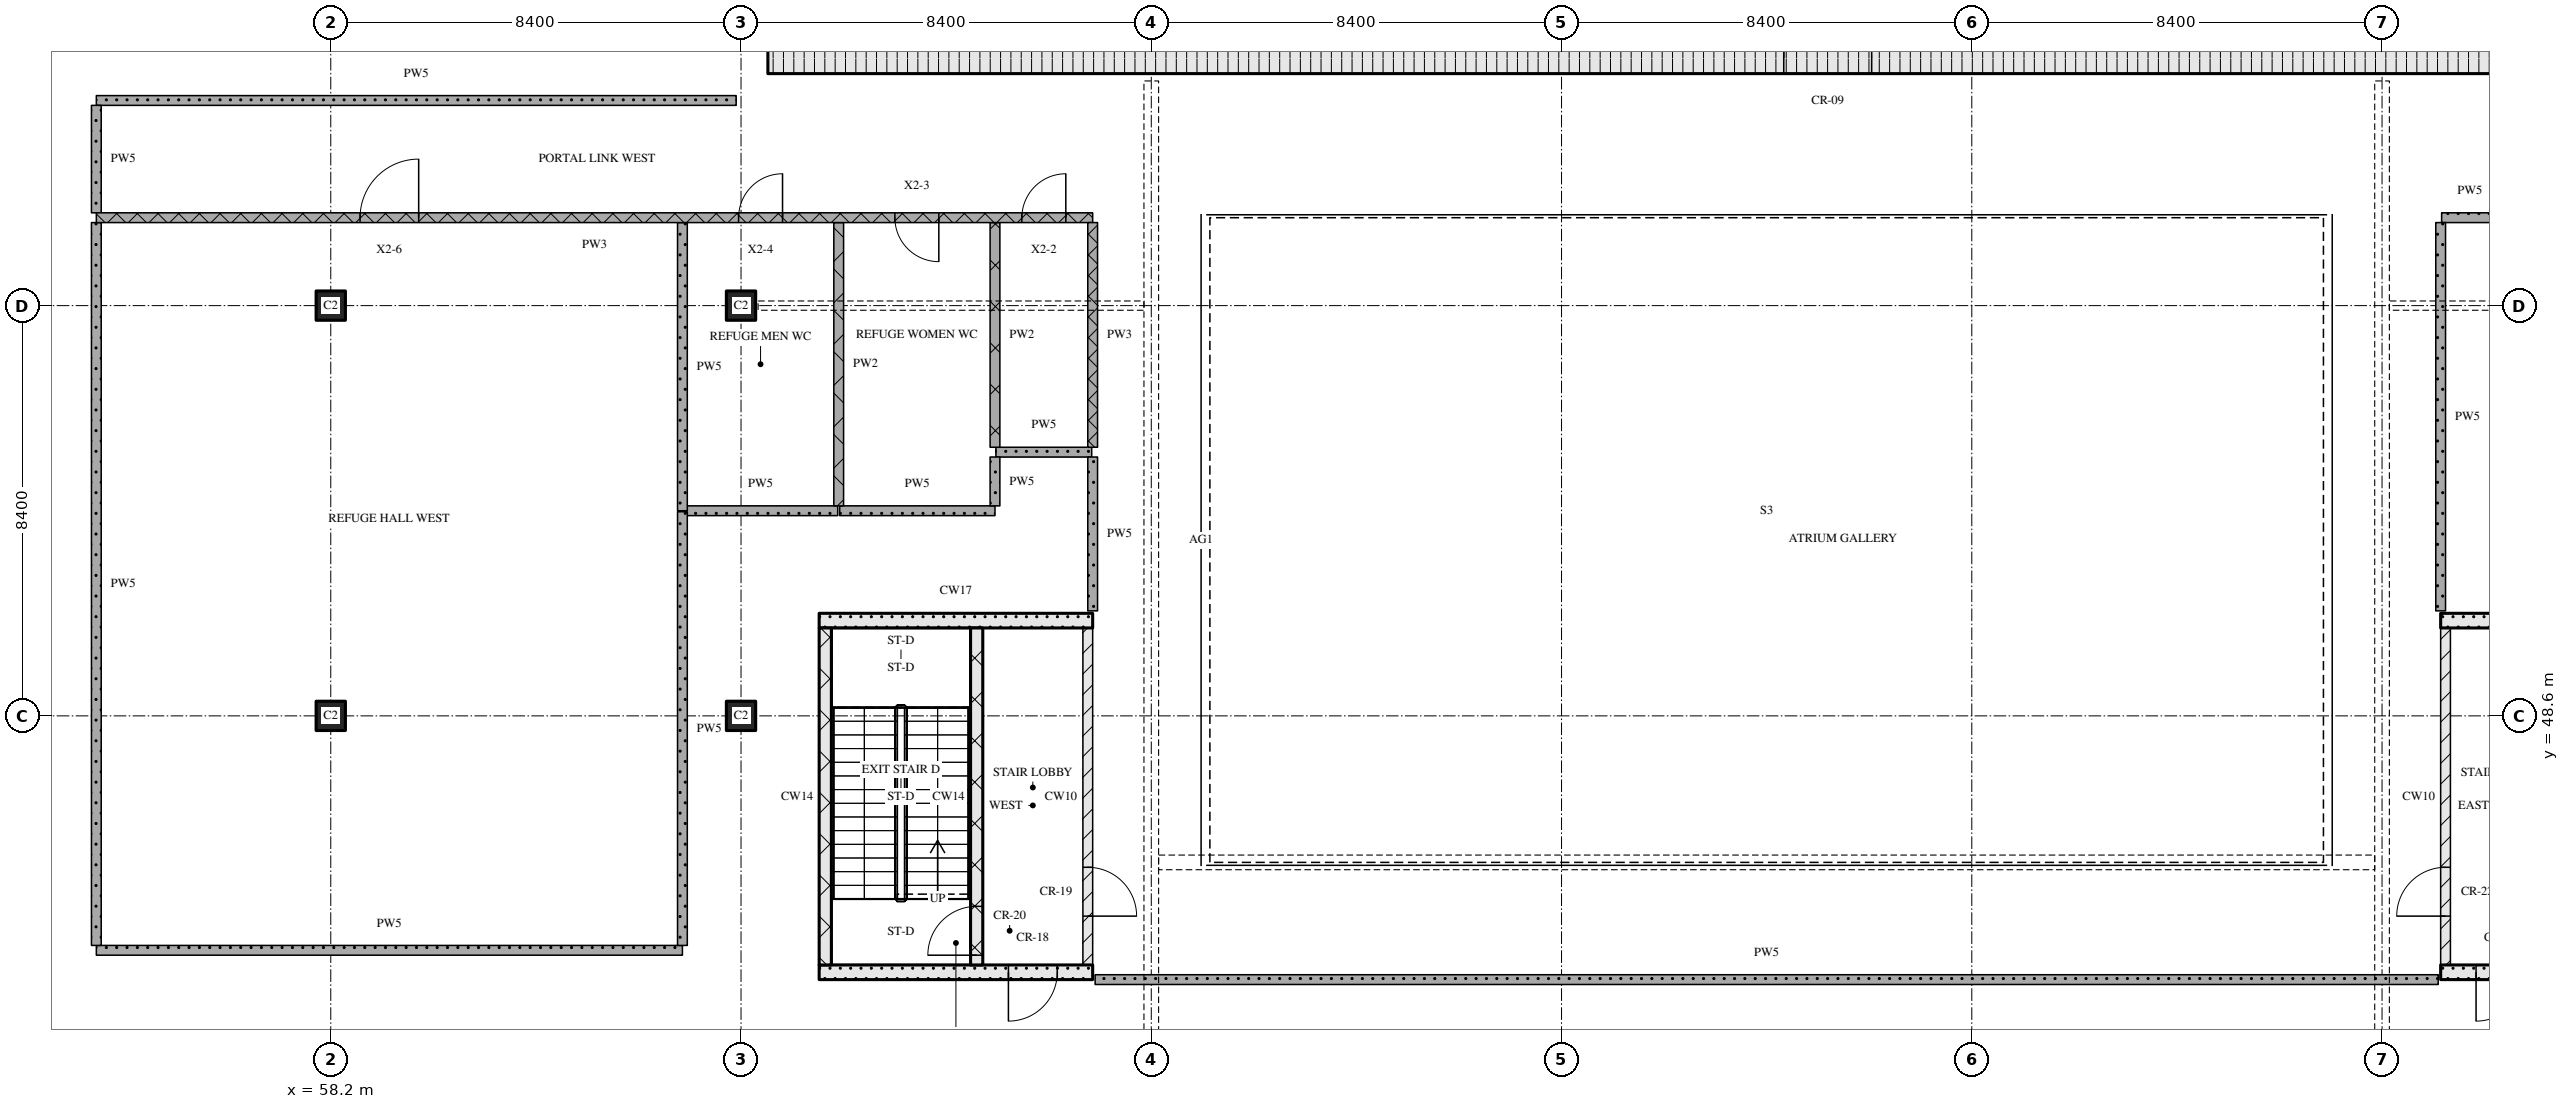
"""IFC4 building model, lengths in metres.
Left out: names, types, materials, properties, quantities, classifications, styles, units other than length and angle.
Written with IfcOpenShell. Run it as: python <this file> out.ifc"""

import sys

from ifc_helpers import new_model, si_unit, direction, frame, frame_2d, origin, origin_2d, place, context, subcontext, project, spatial, rectangle, extrude, element, fill, save


model = new_model("IFC4")
c1 = context("Model", 3, precision=1e-05, world=origin(), true_north=direction((0.0, 1.0)))
c2 = subcontext(c1, "Body", "Model", "MODEL_VIEW")
j1 = project(units=[si_unit("LENGTHUNIT", "METRE"), si_unit("PLANEANGLEUNIT", "RADIAN")], contexts=[c1])
p1 = place(None, origin())
s1 = spatial("IfcSite", under=j1, at=p1, CompositionType="ELEMENT")
p2 = place(p1, origin())
s2 = spatial("IfcBuilding", under=s1, at=p2, CompositionType="ELEMENT")
p3 = place(p2, frame((0.0, 0.0, 194.25)))
s3 = spatial("IfcBuildingStorey", under=s2, at=p3, CompositionType="ELEMENT", Elevation=194.25)
for number, where, z_axis, x_axis in (
    (1, (58.2, 48.6, 0.0), (0.0, 0.0, 1.0), (1.0, 0.0, 0.0)),
    (2, (58.2, 57.0, 0.0), (0.0, 0.0, 1.0), (1.0, 0.0, 0.0)),
    (3, (66.6, 48.6, 0.0), (0.0, 0.0, 1.0), (1.0, 0.0, 0.0)),
    (4, (66.6, 57.0, 0.0), (0.0, 0.0, 1.0), (1.0, 0.0, 0.0)),
):
    element("IfcColumn", number, at=place(p3, frame(where, z_axis=z_axis, x_axis=x_axis)), inside=s3, PredefinedType="COLUMN", context=c2, shape_type="SweptSolid", body=[
        extrude(rectangle(XDim=0.6, YDim=0.6, at=origin_2d()), origin(), (0.0, 0.0, 1.0), 11.25),
    ])
p4 = place(p3, frame((67.15, 62.075, 0.0), z_axis=(0.0, 0.0, 1.0), x_axis=(1.0, 0.0, 0.0)))
e5 = element("IfcWall", 5, at=p4, inside=s3, PredefinedType="SOLIDWALL", context=c2, shape_type="SweptSolid", body=[
    extrude(rectangle(XDim=40.9, YDim=0.65, at=frame_2d((20.45, 0.0))), origin(), (0.0, 0.0, 1.0), 10.97),
])
p5 = place(p4, frame((20.8, 0.0, 0.0)))
e6 = element("IfcOpeningElement", 6, at=p5, cuts=e5, PredefinedType="OPENING", context=c2, shape_type="SweptSolid", body=[
    extrude(rectangle(XDim=1.8, YDim=2.1, at=frame_2d((0.9, 1.05))), frame((0.0, 0.335, 0.0), z_axis=(0.0, -1.0, 0.0), x_axis=(1.0, 0.0, 0.0)), (0.0, 0.0, 1.0), 0.67),
])
p6 = place(p3, frame((68.2, 43.35, 0.0), z_axis=(0.0, 0.0, 1.0), x_axis=(1.0, 0.0, 0.0)))
e7 = element("IfcWall", 7, at=p6, inside=s3, PredefinedType="SOLIDWALL", context=c2, shape_type="SweptSolid", body=[
    extrude(rectangle(XDim=5.6, YDim=0.3, at=frame_2d((2.8, 0.0))), origin(), (0.0, 0.0, 1.0), 10.97),
])
p7 = place(p6, frame((3.875, 0.0, 0.0)))
e8 = element("IfcOpeningElement", 8, at=p7, cuts=e7, PredefinedType="OPENING", context=c2, shape_type="SweptSolid", body=[
    extrude(rectangle(XDim=1.0, YDim=2.1, at=frame_2d((0.5, 1.05))), frame((0.0, 0.16, 0.0), z_axis=(0.0, -1.0, 0.0), x_axis=(1.0, 0.0, 0.0)), (0.0, 0.0, 1.0), 0.32),
])
p8 = place(p3, frame((68.325, 43.5, 0.0), z_axis=(0.0, 0.0, 1.0), x_axis=(0.0, 1.0, 0.0)))
e9 = element("IfcWall", 9, at=p8, inside=s3, PredefinedType="SOLIDWALL", context=c2, shape_type="SweptSolid", body=[
    extrude(rectangle(XDim=6.9, YDim=0.25, at=frame_2d((3.45, 0.0))), origin(), (0.0, 0.0, 1.0), 10.97),
])
p9 = place(p3, frame((71.425, 43.5, 0.0), z_axis=(0.0, 0.0, 1.0), x_axis=(0.0, 1.0, 0.0)))
e10 = element("IfcWall", 10, at=p9, inside=s3, PredefinedType="SOLIDWALL", context=c2, shape_type="SweptSolid", body=[
    extrude(rectangle(XDim=6.9, YDim=0.25, at=frame_2d((3.45, 0.0))), origin(), (0.0, 0.0, 1.0), 10.97),
])
p10 = place(p9, frame((0.2, 0.0, 0.0)))
e11 = element("IfcOpeningElement", 11, at=p10, cuts=e10, PredefinedType="OPENING", context=c2, shape_type="SweptSolid", body=[
    extrude(rectangle(XDim=1.0, YDim=2.1, at=frame_2d((0.5, 1.05))), frame((0.0, 0.135, 0.0), z_axis=(0.0, -1.0, 0.0), x_axis=(1.0, 0.0, 0.0)), (0.0, 0.0, 1.0), 0.27),
])
p11 = place(p3, frame((73.7, 43.5, 0.0), z_axis=(0.0, 0.0, 1.0), x_axis=(0.0, 1.0, 0.0)))
e12 = element("IfcWall", 12, at=p11, inside=s3, PredefinedType="PARTITIONING", context=c2, shape_type="SweptSolid", body=[
    extrude(rectangle(XDim=6.9, YDim=0.2, at=frame_2d((3.45, 0.0))), origin(), (0.0, 0.0, 1.0), 10.97),
])
p12 = place(p11, frame((1.0, 0.0, 0.0)))
e13 = element("IfcOpeningElement", 13, at=p12, cuts=e12, PredefinedType="OPENING", context=c2, shape_type="SweptSolid", body=[
    extrude(rectangle(XDim=1.0, YDim=2.1, at=frame_2d((0.5, 1.05))), frame((0.0, 0.11, 0.0), z_axis=(0.0, -1.0, 0.0), x_axis=(1.0, 0.0, 0.0)), (0.0, 0.0, 1.0), 0.22),
])
p13 = place(p3, frame((68.2, 50.55, 0.0), z_axis=(0.0, 0.0, 1.0), x_axis=(1.0, 0.0, 0.0)))
e14 = element("IfcWall", 14, at=p13, inside=s3, PredefinedType="SOLIDWALL", context=c2, shape_type="SweptSolid", body=[
    extrude(rectangle(XDim=5.6, YDim=0.3, at=frame_2d((2.8, 0.0))), origin(), (0.0, 0.0, 1.0), 10.97),
])
p14 = place(p3, frame((101.4, 43.35, 0.0), z_axis=(0.0, 0.0, 1.0), x_axis=(1.0, 0.0, 0.0)))
e15 = element("IfcWall", 15, at=p14, inside=s3, PredefinedType="SOLIDWALL", context=c2, shape_type="SweptSolid", body=[
    extrude(rectangle(XDim=5.6, YDim=0.3, at=frame_2d((2.8, 0.0))), origin(), (0.0, 0.0, 1.0), 10.97),
])
p15 = place(p14, frame((0.725, 0.0, 0.0)))
e16 = element("IfcOpeningElement", 16, at=p15, cuts=e15, PredefinedType="OPENING", context=c2, shape_type="SweptSolid", body=[
    extrude(rectangle(XDim=1.0, YDim=2.1, at=frame_2d((0.5, 1.05))), frame((0.0, 0.16, 0.0), z_axis=(0.0, -1.0, 0.0), x_axis=(1.0, 0.0, 0.0)), (0.0, 0.0, 1.0), 0.32),
])
p16 = place(p3, frame((101.5, 43.5, 0.0), z_axis=(0.0, 0.0, 1.0), x_axis=(0.0, 1.0, 0.0)))
e17 = element("IfcWall", 17, at=p16, inside=s3, PredefinedType="PARTITIONING", context=c2, shape_type="SweptSolid", body=[
    extrude(rectangle(XDim=6.9, YDim=0.2, at=frame_2d((3.45, 0.0))), origin(), (0.0, 0.0, 1.0), 10.97),
])
p17 = place(p16, frame((1.0, 0.0, 0.0)))
e18 = element("IfcOpeningElement", 18, at=p17, cuts=e17, PredefinedType="OPENING", context=c2, shape_type="SweptSolid", body=[
    extrude(rectangle(XDim=1.0, YDim=2.1, at=frame_2d((0.5, 1.05))), frame((0.0, 0.11, 0.0), z_axis=(0.0, -1.0, 0.0), x_axis=(1.0, 0.0, 0.0)), (0.0, 0.0, 1.0), 0.22),
])
p18 = place(p3, frame((101.4, 50.55, 0.0), z_axis=(0.0, 0.0, 1.0), x_axis=(1.0, 0.0, 0.0)))
e19 = element("IfcWall", 19, at=p18, inside=s3, PredefinedType="SOLIDWALL", context=c2, shape_type="SweptSolid", body=[
    extrude(rectangle(XDim=5.6, YDim=0.3, at=frame_2d((2.8, 0.0))), origin(), (0.0, 0.0, 1.0), 10.97),
])
p19 = place(p3, frame((73.85, 43.2, 0.0), z_axis=(0.0, 0.0, 1.0), x_axis=(1.0, 0.0, 0.0)))
e20 = element("IfcWall", 20, at=p19, inside=s3, PredefinedType="PARTITIONING", context=c2, shape_type="SweptSolid", body=[
    extrude(rectangle(XDim=27.5, YDim=0.2, at=frame_2d((13.75, 0.0))), origin(), (0.0, 0.0, 1.0), 10.97),
])
p20 = place(p3, frame((53.4, 43.8, 0.0), z_axis=(0.0, 0.0, 1.0), x_axis=(1.0, 0.0, 0.0)))
e21 = element("IfcWall", 21, at=p20, inside=s3, PredefinedType="PARTITIONING", context=c2, shape_type="SweptSolid", body=[
    extrude(rectangle(XDim=12.0, YDim=0.2, at=frame_2d((6.0, 0.0))), origin(), (0.0, 0.0, 1.0), 10.97),
])
p21 = place(p3, frame((65.42, 52.8, 0.0), z_axis=(0.0, 0.0, 1.0), x_axis=(1.0, 0.0, 0.0)))
e22 = element("IfcWall", 22, at=p21, inside=s3, PredefinedType="PARTITIONING", context=c2, shape_type="SweptSolid", body=[
    extrude(rectangle(XDim=3.16, YDim=0.2, at=frame_2d((1.58, 0.0))), origin(), (0.0, 0.0, 1.0), 10.97),
])
p22 = place(p3, frame((68.62, 52.8, 0.0), z_axis=(0.0, 0.0, 1.0), x_axis=(1.0, 0.0, 0.0)))
e23 = element("IfcWall", 23, at=p22, inside=s3, PredefinedType="PARTITIONING", context=c2, shape_type="SweptSolid", body=[
    extrude(rectangle(XDim=3.18, YDim=0.2, at=frame_2d((1.59, 0.0))), origin(), (0.0, 0.0, 1.0), 10.97),
])
p23 = place(p3, frame((71.82, 54.0, 0.0), z_axis=(0.0, 0.0, 1.0), x_axis=(1.0, 0.0, 0.0)))
e24 = element("IfcWall", 24, at=p23, inside=s3, PredefinedType="PARTITIONING", context=c2, shape_type="SweptSolid", body=[
    extrude(rectangle(XDim=1.96, YDim=0.2, at=frame_2d((0.98, 0.0))), origin(), (0.0, 0.0, 1.0), 10.97),
])
p24 = place(p3, frame((73.8, 58.8, 0.0), z_axis=(0.0, 0.0, 1.0), x_axis=(-1.0, 0.0, 0.0)))
e25 = element("IfcWall", 25, at=p24, inside=s3, PredefinedType="PARTITIONING", context=c2, shape_type="SweptSolid", body=[
    extrude(rectangle(XDim=20.4, YDim=0.2, at=frame_2d((10.2, 0.0))), origin(), (0.0, 0.0, 1.0), 10.97),
])
p25 = place(p24, frame((0.55, 0.0, 0.0)))
e26 = element("IfcOpeningElement", 26, at=p25, cuts=e25, PredefinedType="OPENING", context=c2, shape_type="SweptSolid", body=[
    extrude(rectangle(XDim=0.9, YDim=2.1, at=frame_2d((0.45, 1.05))), frame((0.0, 0.11, 0.0), z_axis=(0.0, -1.0, 0.0), x_axis=(1.0, 0.0, 0.0)), (0.0, 0.0, 1.0), 0.22),
])
p26 = place(p24, frame((3.15, 0.0, 0.0)))
e27 = element("IfcOpeningElement", 27, at=p26, cuts=e25, PredefinedType="OPENING", context=c2, shape_type="SweptSolid", body=[
    extrude(rectangle(XDim=0.9, YDim=2.1, at=frame_2d((0.45, 1.05))), frame((0.0, 0.11, 0.0), z_axis=(0.0, -1.0, 0.0), x_axis=(1.0, 0.0, 0.0)), (0.0, 0.0, 1.0), 0.22),
])
p27 = place(p24, frame((6.35, 0.0, 0.0)))
e28 = element("IfcOpeningElement", 28, at=p27, cuts=e25, PredefinedType="OPENING", context=c2, shape_type="SweptSolid", body=[
    extrude(rectangle(XDim=0.9, YDim=2.1, at=frame_2d((0.45, 1.05))), frame((0.0, 0.11, 0.0), z_axis=(0.0, -1.0, 0.0), x_axis=(1.0, 0.0, 0.0)), (0.0, 0.0, 1.0), 0.22),
])
p28 = place(p24, frame((13.8, 0.0, 0.0)))
e29 = element("IfcOpeningElement", 29, at=p28, cuts=e25, PredefinedType="OPENING", context=c2, shape_type="SweptSolid", body=[
    extrude(rectangle(XDim=1.2, YDim=2.1, at=frame_2d((0.6, 1.05))), frame((0.0, 0.11, 0.0), z_axis=(0.0, -1.0, 0.0), x_axis=(1.0, 0.0, 0.0)), (0.0, 0.0, 1.0), 0.22),
])
p29 = place(p3, frame((101.42, 58.8, 0.0), z_axis=(0.0, 0.0, 1.0), x_axis=(1.0, 0.0, 0.0)))
e30 = element("IfcWall", 30, at=p29, inside=s3, PredefinedType="PARTITIONING", context=c2, shape_type="SweptSolid", body=[
    extrude(rectangle(XDim=1.16, YDim=0.2, at=frame_2d((0.58, 0.0))), origin(), (0.0, 0.0, 1.0), 10.97),
])
p30 = place(p3, frame((53.4, 61.2, 0.0), z_axis=(0.0, 0.0, 1.0), x_axis=(1.0, 0.0, 0.0)))
e31 = element("IfcWall", 31, at=p30, inside=s3, PredefinedType="PARTITIONING", context=c2, shape_type="SweptSolid", body=[
    extrude(rectangle(XDim=13.1, YDim=0.2, at=frame_2d((6.55, 0.0))), origin(), (0.0, 0.0, 1.0), 10.97),
])
p31 = place(p3, frame((53.4, 58.7, 0.0), z_axis=(0.0, 0.0, 1.0), x_axis=(0.0, -1.0, 0.0)))
e32 = element("IfcWall", 32, at=p31, inside=s3, PredefinedType="PARTITIONING", context=c2, shape_type="SweptSolid", body=[
    extrude(rectangle(XDim=14.8, YDim=0.2, at=frame_2d((7.4, 0.0))), origin(), (0.0, 0.0, 1.0), 10.97),
])
p32 = place(p3, frame((53.4, 61.1, 0.0), z_axis=(0.0, 0.0, 1.0), x_axis=(0.0, -1.0, 0.0)))
e33 = element("IfcWall", 33, at=p32, inside=s3, PredefinedType="PARTITIONING", context=c2, shape_type="SweptSolid", body=[
    extrude(rectangle(XDim=2.2, YDim=0.2, at=frame_2d((1.1, 0.0))), origin(), (0.0, 0.0, 1.0), 10.97),
])
p33 = place(p3, frame((65.4, 52.78, 0.0), z_axis=(0.0, 0.0, 1.0), x_axis=(0.0, -1.0, 0.0)))
e34 = element("IfcWall", 34, at=p33, inside=s3, PredefinedType="PARTITIONING", context=c2, shape_type="SweptSolid", body=[
    extrude(rectangle(XDim=8.88, YDim=0.2, at=frame_2d((4.44, 0.0))), origin(), (0.0, 0.0, 1.0), 10.97),
])
p34 = place(p3, frame((65.4, 58.7, 0.0), z_axis=(0.0, 0.0, 1.0), x_axis=(0.0, -1.0, 0.0)))
e35 = element("IfcWall", 35, at=p34, inside=s3, PredefinedType="PARTITIONING", context=c2, shape_type="SweptSolid", body=[
    extrude(rectangle(XDim=5.9, YDim=0.2, at=frame_2d((2.95, 0.0))), origin(), (0.0, 0.0, 1.0), 10.97),
])
p35 = place(p3, frame((68.6, 58.7, 0.0), z_axis=(0.0, 0.0, 1.0), x_axis=(0.0, -1.0, 0.0)))
e36 = element("IfcWall", 36, at=p35, inside=s3, PredefinedType="PARTITIONING", context=c2, shape_type="SweptSolid", body=[
    extrude(rectangle(XDim=5.8, YDim=0.2, at=frame_2d((2.9, 0.0))), origin(), (0.0, 0.0, 1.0), 10.97),
])
p36 = place(p3, frame((71.8, 58.7, 0.0), z_axis=(0.0, 0.0, 1.0), x_axis=(0.0, -1.0, 0.0)))
e37 = element("IfcWall", 37, at=p36, inside=s3, PredefinedType="PARTITIONING", context=c2, shape_type="SweptSolid", body=[
    extrude(rectangle(XDim=4.6, YDim=0.2, at=frame_2d((2.3, 0.0))), origin(), (0.0, 0.0, 1.0), 10.97),
])
p37 = place(p3, frame((71.8, 53.9, 0.0), z_axis=(0.0, 0.0, 1.0), x_axis=(0.0, -1.0, 0.0)))
e38 = element("IfcWall", 38, at=p37, inside=s3, PredefinedType="PARTITIONING", context=c2, shape_type="SweptSolid", body=[
    extrude(rectangle(XDim=1.0, YDim=0.2, at=frame_2d((0.5, 0.0))), origin(), (0.0, 0.0, 1.0), 10.97),
])
p38 = place(p3, frame((73.8, 58.7, 0.0), z_axis=(0.0, 0.0, 1.0), x_axis=(0.0, -1.0, 0.0)))
e39 = element("IfcWall", 39, at=p38, inside=s3, PredefinedType="PARTITIONING", context=c2, shape_type="SweptSolid", body=[
    extrude(rectangle(XDim=4.6, YDim=0.2, at=frame_2d((2.3, 0.0))), origin(), (0.0, 0.0, 1.0), 10.97),
])
p39 = place(p3, frame((73.8, 53.9, 0.0), z_axis=(0.0, 0.0, 1.0), x_axis=(0.0, -1.0, 0.0)))
e40 = element("IfcWall", 40, at=p39, inside=s3, PredefinedType="PARTITIONING", context=c2, shape_type="SweptSolid", body=[
    extrude(rectangle(XDim=3.15, YDim=0.2, at=frame_2d((1.575, 0.0))), origin(), (0.0, 0.0, 1.0), 10.97),
])
p40 = place(p3, frame((101.4, 58.7, 0.0), z_axis=(0.0, 0.0, 1.0), x_axis=(0.0, -1.0, 0.0)))
e41 = element("IfcWall", 41, at=p40, inside=s3, PredefinedType="PARTITIONING", context=c2, shape_type="SweptSolid", body=[
    extrude(rectangle(XDim=7.95, YDim=0.2, at=frame_2d((3.975, 0.0))), origin(), (0.0, 0.0, 1.0), 10.97),
])
p41 = place(p5, origin())
e42 = element("IfcDoor", 42, at=p41, inside=s3, OperationType="DOUBLE_DOOR_SINGLE_SWING", PredefinedType="DOOR", context=c2, shape_type="SweptSolid", body=[
    extrude(rectangle(XDim=1.8, YDim=2.1, at=frame_2d((0.9, 1.05))), frame((0.0, 0.025, 0.0), z_axis=(0.0, -1.0, 0.0), x_axis=(1.0, 0.0, 0.0)), (0.0, 0.0, 1.0), 0.05),
])
fill(e6, e42)
p42 = place(p7, origin())
e43 = element("IfcDoor", 43, at=p42, inside=s3, OperationType="SINGLE_SWING_RIGHT", PredefinedType="DOOR", context=c2, shape_type="SweptSolid", body=[
    extrude(rectangle(XDim=1.0, YDim=2.1, at=frame_2d((0.5, 1.05))), frame((0.0, 0.025, 0.0), z_axis=(0.0, -1.0, 0.0), x_axis=(1.0, 0.0, 0.0)), (0.0, 0.0, 1.0), 0.05),
])
fill(e8, e43)
p43 = place(p10, origin())
e44 = element("IfcDoor", 44, at=p43, inside=s3, OperationType="SINGLE_SWING_LEFT", PredefinedType="DOOR", context=c2, shape_type="SweptSolid", body=[
    extrude(rectangle(XDim=1.0, YDim=2.1, at=frame_2d((0.5, 1.05))), frame((0.0, 0.025, 0.0), z_axis=(0.0, -1.0, 0.0), x_axis=(1.0, 0.0, 0.0)), (0.0, 0.0, 1.0), 0.05),
])
fill(e11, e44)
p44 = place(p12, origin())
e45 = element("IfcDoor", 45, at=p44, inside=s3, OperationType="SINGLE_SWING_RIGHT", PredefinedType="DOOR", context=c2, shape_type="SweptSolid", body=[
    extrude(rectangle(XDim=1.0, YDim=2.1, at=frame_2d((0.5, 1.05))), frame((0.0, 0.025, 0.0), z_axis=(0.0, -1.0, 0.0), x_axis=(1.0, 0.0, 0.0)), (0.0, 0.0, 1.0), 0.05),
])
fill(e13, e45)
p45 = place(p15, origin())
e46 = element("IfcDoor", 46, at=p45, inside=s3, OperationType="SINGLE_SWING_RIGHT", PredefinedType="DOOR", context=c2, shape_type="SweptSolid", body=[
    extrude(rectangle(XDim=1.0, YDim=2.1, at=frame_2d((0.5, 1.05))), frame((0.0, 0.025, 0.0), z_axis=(0.0, -1.0, 0.0), x_axis=(1.0, 0.0, 0.0)), (0.0, 0.0, 1.0), 0.05),
])
fill(e16, e46)
p46 = place(p17, origin())
e47 = element("IfcDoor", 47, at=p46, inside=s3, OperationType="SINGLE_SWING_LEFT", PredefinedType="DOOR", context=c2, shape_type="SweptSolid", body=[
    extrude(rectangle(XDim=1.0, YDim=2.1, at=frame_2d((0.5, 1.05))), frame((0.0, 0.025, 0.0), z_axis=(0.0, -1.0, 0.0), x_axis=(1.0, 0.0, 0.0)), (0.0, 0.0, 1.0), 0.05),
])
fill(e18, e47)
p47 = place(p25, origin())
e48 = element("IfcDoor", 48, at=p47, inside=s3, OperationType="SINGLE_SWING_RIGHT", PredefinedType="DOOR", context=c2, shape_type="SweptSolid", body=[
    extrude(rectangle(XDim=0.9, YDim=2.1, at=frame_2d((0.45, 1.05))), frame((0.0, 0.025, 0.0), z_axis=(0.0, -1.0, 0.0), x_axis=(1.0, 0.0, 0.0)), (0.0, 0.0, 1.0), 0.05),
])
fill(e26, e48)
p48 = place(p26, origin())
e49 = element("IfcDoor", 49, at=p48, inside=s3, OperationType="SINGLE_SWING_LEFT", PredefinedType="DOOR", context=c2, shape_type="SweptSolid", body=[
    extrude(rectangle(XDim=0.9, YDim=2.1, at=frame_2d((0.45, 1.05))), frame((0.0, 0.025, 0.0), z_axis=(0.0, -1.0, 0.0), x_axis=(1.0, 0.0, 0.0)), (0.0, 0.0, 1.0), 0.05),
])
fill(e27, e49)
p49 = place(p27, origin())
e50 = element("IfcDoor", 50, at=p49, inside=s3, OperationType="SINGLE_SWING_RIGHT", PredefinedType="DOOR", context=c2, shape_type="SweptSolid", body=[
    extrude(rectangle(XDim=0.9, YDim=2.1, at=frame_2d((0.45, 1.05))), frame((0.0, 0.025, 0.0), z_axis=(0.0, -1.0, 0.0), x_axis=(1.0, 0.0, 0.0)), (0.0, 0.0, 1.0), 0.05),
])
fill(e28, e50)
p50 = place(p28, origin())
e51 = element("IfcDoor", 51, at=p50, inside=s3, OperationType="SINGLE_SWING_RIGHT", PredefinedType="DOOR", context=c2, shape_type="SweptSolid", body=[
    extrude(rectangle(XDim=1.2, YDim=2.1, at=frame_2d((0.6, 1.05))), frame((0.0, 0.025, 0.0), z_axis=(0.0, -1.0, 0.0), x_axis=(1.0, 0.0, 0.0)), (0.0, 0.0, 1.0), 0.05),
])
fill(e29, e51)
save(model, sys.argv[1])
